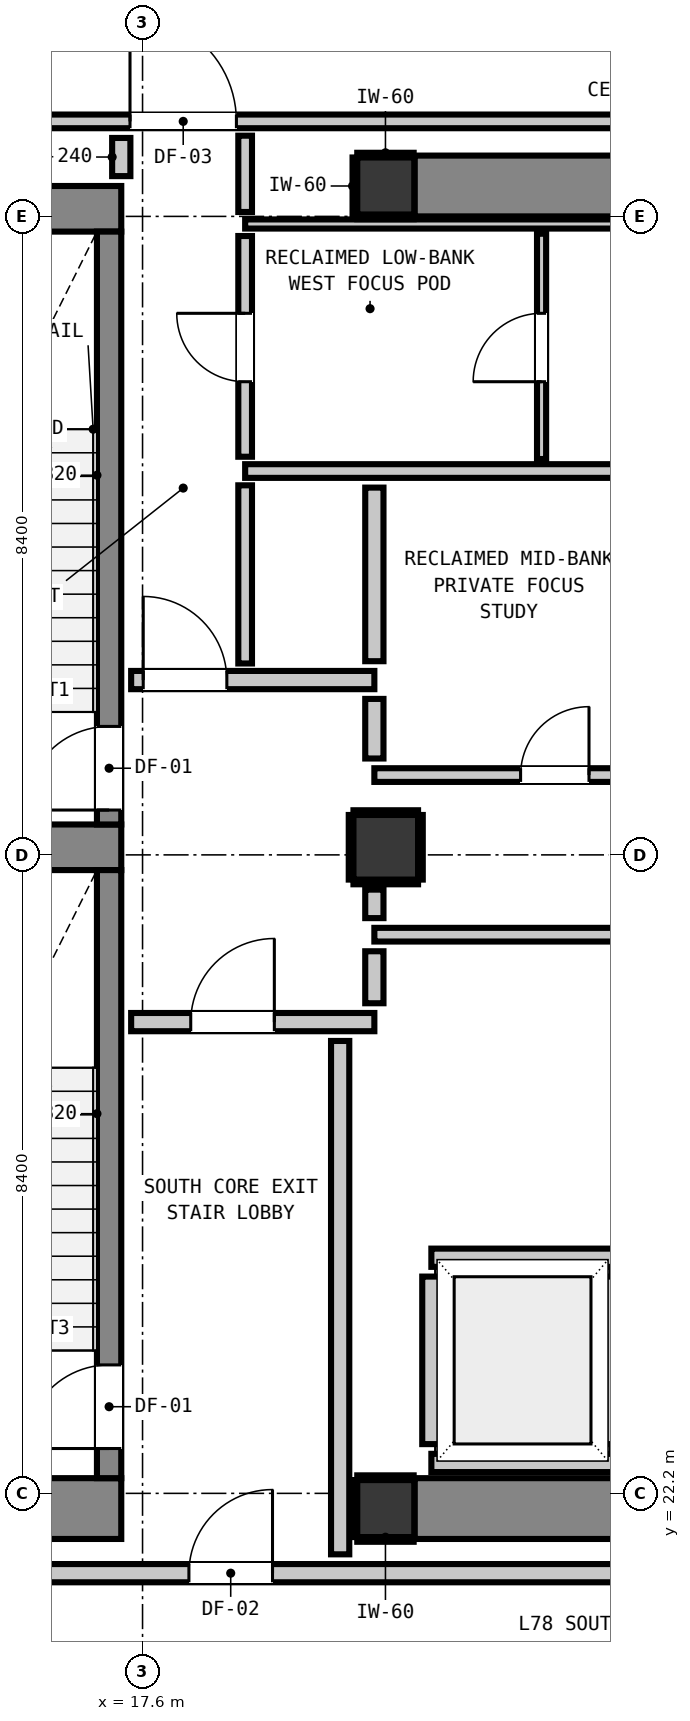
"""IFC4 building model, lengths in metres.
Left out: names, types, materials, properties, quantities, classifications, styles, units other than length and angle.
Written with IfcOpenShell. Run it as: python <this file> out.ifc"""

import sys

from ifc_helpers import new_model, si_unit, direction, frame, frame_2d, origin, origin_2d, place, context, subcontext, project, spatial, rectangle, extrude, element, fill, save


model = new_model("IFC4")
c1 = context("Model", 3, precision=1e-05, world=origin(), true_north=direction((0.0, 1.0)))
c2 = subcontext(c1, "Body", "Model", "MODEL_VIEW")
j1 = project(units=[si_unit("LENGTHUNIT", "METRE"), si_unit("PLANEANGLEUNIT", "RADIAN")], contexts=[c1])
p1 = place(None, origin())
s1 = spatial("IfcSite", under=j1, at=p1, CompositionType="ELEMENT")
p2 = place(p1, origin())
s2 = spatial("IfcBuilding", under=s1, at=p2, CompositionType="ELEMENT")
p3 = place(p2, frame((0.0, 0.0, 268.88)))
s3 = spatial("IfcBuildingStorey", under=s2, at=p3, CompositionType="ELEMENT", Elevation=268.88)
for number, where, z_axis, x_axis in (
    (1, (20.8, 22.0, 0.0), (0.0, 0.0, 1.0), (1.0, 0.0, 0.0)),
    (2, (20.8, 39.4, 0.0), (0.0, 0.0, 1.0), (1.0, 0.0, 0.0)),
):
    element("IfcColumn", number, at=place(p3, frame(where, z_axis=z_axis, x_axis=x_axis)), inside=s3, PredefinedType="COLUMN", context=c2, shape_type="SweptSolid", body=[
        extrude(rectangle(XDim=0.75, YDim=0.75, at=origin_2d()), origin(), (0.0, 0.0, 1.0), 4.6),
    ])
p4 = place(p3, frame((13.24, 22.0, 0.0), z_axis=(0.0, 0.0, 1.0), x_axis=(1.0, 0.0, 0.0)))
e3 = element("IfcWall", 3, at=p4, inside=s3, PredefinedType="SHEAR", context=c2, shape_type="SweptSolid", body=[
    extrude(rectangle(XDim=4.08, YDim=0.8, at=frame_2d((2.04, 0.0))), origin(), (0.0, 0.0, 1.0), 4.6),
])
p5 = place(p3, frame((13.24, 39.1, 0.0), z_axis=(0.0, 0.0, 1.0), x_axis=(1.0, 0.0, 0.0)))
e4 = element("IfcWall", 4, at=p5, inside=s3, PredefinedType="SHEAR", context=c2, shape_type="SweptSolid", body=[
    extrude(rectangle(XDim=4.08, YDim=0.6, at=frame_2d((2.04, 0.0))), origin(), (0.0, 0.0, 1.0), 4.6),
])
p6 = place(p3, frame((13.78, 30.7, 0.0), z_axis=(0.0, 0.0, 1.0), x_axis=(1.0, 0.0, 0.0)))
e5 = element("IfcWall", 5, at=p6, inside=s3, PredefinedType="SHEAR", context=c2, shape_type="SweptSolid", body=[
    extrude(rectangle(XDim=3.54, YDim=0.6, at=frame_2d((1.77, 0.0))), origin(), (0.0, 0.0, 1.0), 4.6),
])
for number, where, z_axis, x_axis in (
    (6, (21.18, 22.0, 0.0), (0.0, 0.0, 1.0), (1.0, 0.0, 0.0)),
    (7, (21.18, 39.4, 0.0), (0.0, 0.0, 1.0), (1.0, 0.0, 0.0)),
):
    element("IfcWall", number, at=place(p3, frame(where, z_axis=z_axis, x_axis=x_axis)), inside=s3, PredefinedType="SHEAR", context=c2, shape_type="SweptSolid", body=[
        extrude(rectangle(XDim=7.64, YDim=0.8, at=frame_2d((3.82, 0.0))), origin(), (0.0, 0.0, 1.0), 4.6),
    ])
p7 = place(p3, frame((17.16, 31.0, 0.0), z_axis=(0.0, 0.0, 1.0), x_axis=(0.0, 1.0, 0.0)))
e8 = element("IfcWall", 8, at=p7, inside=s3, PredefinedType="SHEAR", context=c2, shape_type="SweptSolid", body=[
    extrude(rectangle(XDim=7.8, YDim=0.32, at=frame_2d((3.9, 0.0))), origin(), (0.0, 0.0, 1.0), 4.6),
])
p8 = place(p7, frame((0.19, 0.0, 0.0)))
e9 = element("IfcOpeningElement", 9, at=p8, cuts=e8, PredefinedType="OPENING", context=c2, shape_type="SweptSolid", body=[
    extrude(rectangle(XDim=1.1, YDim=2.15, at=frame_2d((0.55, 1.075))), frame((0.0, 0.17, 0.0), z_axis=(0.0, -1.0, 0.0), x_axis=(1.0, 0.0, 0.0)), (0.0, 0.0, 1.0), 0.34),
])
p9 = place(p3, frame((17.16, 22.4, 0.0), z_axis=(0.0, 0.0, 1.0), x_axis=(0.0, 1.0, 0.0)))
e10 = element("IfcWall", 10, at=p9, inside=s3, PredefinedType="SHEAR", context=c2, shape_type="SweptSolid", body=[
    extrude(rectangle(XDim=8.0, YDim=0.32, at=frame_2d((4.0, 0.0))), origin(), (0.0, 0.0, 1.0), 4.6),
])
p10 = place(p9, frame((0.39, 0.0, 0.0)))
e11 = element("IfcOpeningElement", 11, at=p10, cuts=e10, PredefinedType="OPENING", context=c2, shape_type="SweptSolid", body=[
    extrude(rectangle(XDim=1.1, YDim=2.15, at=frame_2d((0.55, 1.075))), frame((0.0, 0.17, 0.0), z_axis=(0.0, -1.0, 0.0), x_axis=(1.0, 0.0, 0.0)), (0.0, 0.0, 1.0), 0.34),
])
p11 = place(p3, frame((20.8, 30.7, 0.0), z_axis=(0.0, 0.0, 1.0), x_axis=(1.0, 0.0, 0.0)))
e12 = element("IfcColumn", 12, at=p11, inside=s3, PredefinedType="COLUMN", context=c2, shape_type="SweptSolid", body=[
    extrude(rectangle(XDim=0.85, YDim=0.85, at=origin_2d()), origin(), (0.0, 0.0, 1.0), 4.6),
])
for number, where, z_axis, x_axis in (
    (13, (21.4, 22.6, 0.0), (0.0, 0.0, 1.0), (1.0, 0.0, 0.0)),
    (14, (21.4, 25.3, 0.0), (0.0, 0.0, 1.0), (1.0, 0.0, 0.0)),
):
    element("IfcWall", number, at=place(p3, frame(where, z_axis=z_axis, x_axis=x_axis)), inside=s3, PredefinedType="PARTITIONING", context=c2, shape_type="SweptSolid", body=[
        extrude(rectangle(XDim=2.4, YDim=0.24, at=frame_2d((1.2, 0.0))), origin(), (0.0, 0.0, 1.0), 4.38),
    ])
for number, where, z_axis, x_axis in (
    (15, (21.4, 22.848, 0.0), (0.0, 0.0, 1.0), (0.0, 1.0, 0.0)),
    (16, (23.8, 22.848, 0.0), (0.0, 0.0, 1.0), (0.0, 1.0, 0.0)),
):
    element("IfcWall", number, at=place(p3, frame(where, z_axis=z_axis, x_axis=x_axis)), inside=s3, PredefinedType="PARTITIONING", context=c2, shape_type="SweptSolid", body=[
        extrude(rectangle(XDim=2.204, YDim=0.24, at=frame_2d((1.102, 0.0))), origin(), (0.0, 0.0, 1.0), 4.38),
    ])
p12 = place(p3, frame((13.012, 21.15, 0.0), z_axis=(0.0, 0.0, 1.0), x_axis=(1.0, 0.0, 0.0)))
e17 = element("IfcWall", 17, at=p12, inside=s3, PredefinedType="PARTITIONING", context=c2, shape_type="SweptSolid", body=[
    extrude(rectangle(XDim=28.201, YDim=0.24, at=frame_2d((14.101, 0.0))), origin(), (0.0, 0.0, 1.0), 4.38),
])
p13 = place(p12, frame((5.198, 0.0, 0.0)))
e18 = element("IfcOpeningElement", 18, at=p13, cuts=e17, PredefinedType="OPENING", context=c2, shape_type="SweptSolid", body=[
    extrude(rectangle(XDim=1.1, YDim=2.15, at=frame_2d((0.55, 1.075))), frame((0.0, 0.13, 0.0), z_axis=(0.0, -1.0, 0.0), x_axis=(1.0, 0.0, 0.0)), (0.0, 0.0, 1.0), 0.26),
])
p14 = place(p12, frame((25.989, 0.0, 0.0)))
e19 = element("IfcOpeningElement", 19, at=p14, cuts=e17, PredefinedType="OPENING", context=c2, shape_type="SweptSolid", body=[
    extrude(rectangle(XDim=0.9, YDim=2.1, at=frame_2d((0.45, 1.05))), frame((0.0, 0.13, 0.0), z_axis=(0.0, -1.0, 0.0), x_axis=(1.0, 0.0, 0.0)), (0.0, 0.0, 1.0), 0.26),
])
p15 = place(p3, frame((17.45, 28.4, 0.0), z_axis=(0.0, 0.0, 1.0), x_axis=(1.0, 0.0, 0.0)))
e20 = element("IfcWall", 20, at=p15, inside=s3, PredefinedType="PARTITIONING", context=c2, shape_type="SweptSolid", body=[
    extrude(rectangle(XDim=3.2, YDim=0.24, at=frame_2d((1.6, 0.0))), origin(), (0.0, 0.0, 1.0), 4.38),
])
p16 = place(p15, frame((0.784, 0.0, 0.0)))
e21 = element("IfcOpeningElement", 21, at=p16, cuts=e20, PredefinedType="OPENING", context=c2, shape_type="SweptSolid", body=[
    extrude(rectangle(XDim=1.1, YDim=2.15, at=frame_2d((0.55, 1.075))), frame((0.0, 0.13, 0.0), z_axis=(0.0, -1.0, 0.0), x_axis=(1.0, 0.0, 0.0)), (0.0, 0.0, 1.0), 0.26),
])
p17 = place(p3, frame((17.45, 32.9, 0.0), z_axis=(0.0, 0.0, 1.0), x_axis=(1.0, 0.0, 0.0)))
e22 = element("IfcWall", 22, at=p17, inside=s3, PredefinedType="PARTITIONING", context=c2, shape_type="SweptSolid", body=[
    extrude(rectangle(XDim=3.2, YDim=0.24, at=frame_2d((1.6, 0.0))), origin(), (0.0, 0.0, 1.0), 4.38),
])
p18 = place(p17, frame((0.159, 0.0, 0.0)))
e23 = element("IfcOpeningElement", 23, at=p18, cuts=e22, PredefinedType="OPENING", context=c2, shape_type="SweptSolid", body=[
    extrude(rectangle(XDim=1.1, YDim=2.15, at=frame_2d((0.55, 1.075))), frame((0.0, 0.13, 0.0), z_axis=(0.0, -1.0, 0.0), x_axis=(1.0, 0.0, 0.0)), (0.0, 0.0, 1.0), 0.26),
])
p19 = place(p3, frame((20.65, 29.55, 0.0), z_axis=(0.0, 0.0, 1.0), x_axis=(1.0, 0.0, 0.0)))
e24 = element("IfcWall", 24, at=p19, inside=s3, PredefinedType="PARTITIONING", context=c2, shape_type="SweptSolid", body=[
    extrude(rectangle(XDim=9.325, YDim=0.18, at=frame_2d((4.663, 0.0))), origin(), (0.0, 0.0, 1.0), 4.38),
])
p20 = place(p3, frame((20.65, 31.65, 0.0), z_axis=(0.0, 0.0, 1.0), x_axis=(1.0, 0.0, 0.0)))
e25 = element("IfcWall", 25, at=p20, inside=s3, PredefinedType="PARTITIONING", context=c2, shape_type="SweptSolid", body=[
    extrude(rectangle(XDim=7.7, YDim=0.18, at=frame_2d((3.85, 0.0))), origin(), (0.0, 0.0, 1.0), 4.38),
])
p21 = place(p20, frame((1.924, 0.0, 0.0)))
e26 = element("IfcOpeningElement", 26, at=p21, cuts=e25, PredefinedType="OPENING", context=c2, shape_type="SweptSolid", body=[
    extrude(rectangle(XDim=0.9, YDim=2.1, at=frame_2d((0.45, 1.05))), frame((0.0, 0.1, 0.0), z_axis=(0.0, -1.0, 0.0), x_axis=(1.0, 0.0, 0.0)), (0.0, 0.0, 1.0), 0.2),
])
p22 = place(p3, frame((18.95, 35.65, 0.0), z_axis=(0.0, 0.0, 1.0), x_axis=(1.0, 0.0, 0.0)))
e27 = element("IfcWall", 27, at=p22, inside=s3, PredefinedType="PARTITIONING", context=c2, shape_type="SweptSolid", body=[
    extrude(rectangle(XDim=11.025, YDim=0.18, at=frame_2d((5.513, 0.0))), origin(), (0.0, 0.0, 1.0), 4.38),
])
p23 = place(p3, frame((4.587, 40.25, 0.0), z_axis=(0.0, 0.0, 1.0), x_axis=(1.0, 0.0, 0.0)))
e28 = element("IfcWall", 28, at=p23, inside=s3, PredefinedType="PARTITIONING", context=c2, shape_type="SweptSolid", body=[
    extrude(rectangle(XDim=36.626, YDim=0.18, at=frame_2d((18.313, 0.0))), origin(), (0.0, 0.0, 1.0), 4.38),
])
p24 = place(p23, frame((12.848, 0.0, 0.0)))
e29 = element("IfcOpeningElement", 29, at=p24, cuts=e28, PredefinedType="OPENING", context=c2, shape_type="SweptSolid", body=[
    extrude(rectangle(XDim=1.4, YDim=2.15, at=frame_2d((0.7, 1.075))), frame((0.0, 0.1, 0.0), z_axis=(0.0, -1.0, 0.0), x_axis=(1.0, 0.0, 0.0)), (0.0, 0.0, 1.0), 0.2),
])
p25 = place(p23, frame((5.863, 0.0, 0.0)))
e30 = element("IfcOpeningElement", 30, at=p25, cuts=e28, PredefinedType="OPENING", context=c2, shape_type="SweptSolid", body=[
    extrude(rectangle(XDim=1.4, YDim=2.15, at=frame_2d((0.7, 1.075))), frame((0.0, 0.1, 0.0), z_axis=(0.0, -1.0, 0.0), x_axis=(1.0, 0.0, 0.0)), (0.0, 0.0, 1.0), 0.2),
])
p26 = place(p23, frame((2.337, 0.0, 0.0)))
e31 = element("IfcOpeningElement", 31, at=p26, cuts=e28, PredefinedType="OPENING", context=c2, shape_type="SweptSolid", body=[
    extrude(rectangle(XDim=0.95, YDim=2.1, at=frame_2d((0.475, 1.05))), frame((0.0, 0.1, 0.0), z_axis=(0.0, -1.0, 0.0), x_axis=(1.0, 0.0, 0.0)), (0.0, 0.0, 1.0), 0.2),
])
p27 = place(p23, frame((34.414, 0.0, 0.0)))
e32 = element("IfcOpeningElement", 32, at=p27, cuts=e28, PredefinedType="OPENING", context=c2, shape_type="SweptSolid", body=[
    extrude(rectangle(XDim=0.9, YDim=2.1, at=frame_2d((0.45, 1.05))), frame((0.0, 0.1, 0.0), z_axis=(0.0, -1.0, 0.0), x_axis=(1.0, 0.0, 0.0)), (0.0, 0.0, 1.0), 0.2),
])
p28 = place(p3, frame((18.95, 38.9, 0.0), z_axis=(0.0, 0.0, 1.0), x_axis=(1.0, 0.0, 0.0)))
e33 = element("IfcWall", 33, at=p28, inside=s3, PredefinedType="PARTITIONING", context=c2, shape_type="SweptSolid", body=[
    extrude(rectangle(XDim=11.025, YDim=0.12, at=frame_2d((5.513, 0.0))), origin(), (0.0, 0.0, 1.0), 4.38),
])
p29 = place(p3, frame((17.32, 39.53, 0.0), z_axis=(0.0, 0.0, 1.0), x_axis=(0.0, 1.0, 0.0)))
e34 = element("IfcWall", 34, at=p29, inside=s3, PredefinedType="PARTITIONING", context=c2, shape_type="SweptSolid", body=[
    extrude(rectangle(XDim=0.502, YDim=0.24, at=frame_2d((0.251, 0.0))), origin(), (0.0, 0.0, 1.0), 4.38),
])
p30 = place(p3, frame((20.2, 21.398, 0.0), z_axis=(0.0, 0.0, 1.0), x_axis=(0.0, 1.0, 0.0)))
e35 = element("IfcWall", 35, at=p30, inside=s3, PredefinedType="PARTITIONING", context=c2, shape_type="SweptSolid", body=[
    extrude(rectangle(XDim=6.754, YDim=0.24, at=frame_2d((3.377, 0.0))), origin(), (0.0, 0.0, 1.0), 4.38),
])
p31 = place(p3, frame((20.65, 28.648, 0.0), z_axis=(0.0, 0.0, 1.0), x_axis=(0.0, 1.0, 0.0)))
e36 = element("IfcWall", 36, at=p31, inside=s3, PredefinedType="PARTITIONING", context=c2, shape_type="SweptSolid", body=[
    extrude(rectangle(XDim=0.684, YDim=0.24, at=frame_2d((0.342, 0.0))), origin(), (0.0, 0.0, 1.0), 3.615),
])
p32 = place(p3, frame((20.65, 29.768, 0.0), z_axis=(0.0, 0.0, 1.0), x_axis=(0.0, 1.0, 0.0)))
e37 = element("IfcWall", 37, at=p32, inside=s3, PredefinedType="PARTITIONING", context=c2, shape_type="SweptSolid", body=[
    extrude(rectangle(XDim=0.375, YDim=0.24, at=frame_2d((0.188, 0.0))), origin(), (0.0, 0.0, 1.0), 3.615),
])
p33 = place(p3, frame((20.65, 31.868, 0.0), z_axis=(0.0, 0.0, 1.0), x_axis=(0.0, 1.0, 0.0)))
e38 = element("IfcWall", 38, at=p33, inside=s3, PredefinedType="PARTITIONING", context=c2, shape_type="SweptSolid", body=[
    extrude(rectangle(XDim=0.784, YDim=0.24, at=frame_2d((0.392, 0.0))), origin(), (0.0, 0.0, 1.0), 3.615),
])
p34 = place(p3, frame((20.65, 33.148, 0.0), z_axis=(0.0, 0.0, 1.0), x_axis=(0.0, 1.0, 0.0)))
e39 = element("IfcWall", 39, at=p34, inside=s3, PredefinedType="PARTITIONING", context=c2, shape_type="SweptSolid", body=[
    extrude(rectangle(XDim=2.284, YDim=0.24, at=frame_2d((1.142, 0.0))), origin(), (0.0, 0.0, 1.0), 3.615),
])
p35 = place(p3, frame((18.95, 33.118, 0.0), z_axis=(0.0, 0.0, 1.0), x_axis=(0.0, 1.0, 0.0)))
e40 = element("IfcWall", 40, at=p35, inside=s3, PredefinedType="PARTITIONING", context=c2, shape_type="SweptSolid", body=[
    extrude(rectangle(XDim=2.344, YDim=0.18, at=frame_2d((1.172, 0.0))), origin(), (0.0, 0.0, 1.0), 4.38),
])
p36 = place(p3, frame((18.95, 35.838, 0.0), z_axis=(0.0, 0.0, 1.0), x_axis=(0.0, 1.0, 0.0)))
e41 = element("IfcWall", 41, at=p36, inside=s3, PredefinedType="PARTITIONING", context=c2, shape_type="SweptSolid", body=[
    extrude(rectangle(XDim=2.904, YDim=0.18, at=frame_2d((1.452, 0.0))), origin(), (0.0, 0.0, 1.0), 4.38),
])
p37 = place(p36, frame((0.987, 0.0, 0.0)))
e42 = element("IfcOpeningElement", 42, at=p37, cuts=e41, PredefinedType="OPENING", context=c2, shape_type="SweptSolid", body=[
    extrude(rectangle(XDim=0.9, YDim=2.1, at=frame_2d((0.45, 1.05))), frame((0.0, 0.1, 0.0), z_axis=(0.0, -1.0, 0.0), x_axis=(1.0, 0.0, 0.0)), (0.0, 0.0, 1.0), 0.2),
])
p38 = place(p3, frame((18.95, 39.058, 0.0), z_axis=(0.0, 0.0, 1.0), x_axis=(0.0, 1.0, 0.0)))
e43 = element("IfcWall", 43, at=p38, inside=s3, PredefinedType="PARTITIONING", context=c2, shape_type="SweptSolid", body=[
    extrude(rectangle(XDim=1.004, YDim=0.18, at=frame_2d((0.502, 0.0))), origin(), (0.0, 0.0, 1.0), 4.38),
])
p39 = place(p3, frame((22.85, 35.808, 0.0), z_axis=(0.0, 0.0, 1.0), x_axis=(0.0, 1.0, 0.0)))
e44 = element("IfcWall", 44, at=p39, inside=s3, PredefinedType="PARTITIONING", context=c2, shape_type="SweptSolid", body=[
    extrude(rectangle(XDim=2.964, YDim=0.12, at=frame_2d((1.482, 0.0))), origin(), (0.0, 0.0, 1.0), 4.38),
])
p40 = place(p39, frame((1.017, 0.0, 0.0)))
e45 = element("IfcOpeningElement", 45, at=p40, cuts=e44, PredefinedType="OPENING", context=c2, shape_type="SweptSolid", body=[
    extrude(rectangle(XDim=0.9, YDim=2.1, at=frame_2d((0.45, 1.05))), frame((0.0, 0.07, 0.0), z_axis=(0.0, -1.0, 0.0), x_axis=(1.0, 0.0, 0.0)), (0.0, 0.0, 1.0), 0.14),
])
for number, where, z_axis, x_axis in (
    (46, (20.425, 21.593, 0.0), (0.0, 0.0, 1.0), (1.0, 0.0, 0.0)),
    (47, (20.425, 22.407, 0.0), (0.0, 0.0, 1.0), (1.0, 0.0, 0.0)),
):
    element("IfcWall", number, at=place(p3, frame(where, z_axis=z_axis, x_axis=x_axis)), inside=s3, PredefinedType="PARTITIONING", context=c2, shape_type="SweptSolid", body=[
        extrude(rectangle(XDim=0.742, YDim=0.06, at=frame_2d((0.371, 0.0))), origin(), (0.0, 0.0, 1.0), 1.45),
    ])
p41 = place(p3, frame((20.393, 21.625, 0.0), z_axis=(0.0, 0.0, 1.0), x_axis=(0.0, 1.0, 0.0)))
e48 = element("IfcWall", 48, at=p41, inside=s3, PredefinedType="PARTITIONING", context=c2, shape_type="SweptSolid", body=[
    extrude(rectangle(XDim=0.75, YDim=0.06, at=frame_2d((0.375, 0.0))), origin(), (0.0, 0.0, 1.0), 1.45),
])
for number, where, z_axis, x_axis in (
    (49, (20.425, 38.993, 0.0), (0.0, 0.0, 1.0), (1.0, 0.0, 0.0)),
    (50, (20.425, 39.807, 0.0), (0.0, 0.0, 1.0), (1.0, 0.0, 0.0)),
):
    element("IfcWall", number, at=place(p3, frame(where, z_axis=z_axis, x_axis=x_axis)), inside=s3, PredefinedType="PARTITIONING", context=c2, shape_type="SweptSolid", body=[
        extrude(rectangle(XDim=0.742, YDim=0.06, at=frame_2d((0.371, 0.0))), origin(), (0.0, 0.0, 1.0), 1.45),
    ])
p42 = place(p3, frame((20.393, 39.025, 0.0), z_axis=(0.0, 0.0, 1.0), x_axis=(0.0, 1.0, 0.0)))
e51 = element("IfcWall", 51, at=p42, inside=s3, PredefinedType="PARTITIONING", context=c2, shape_type="SweptSolid", body=[
    extrude(rectangle(XDim=0.75, YDim=0.06, at=frame_2d((0.375, 0.0))), origin(), (0.0, 0.0, 1.0), 1.45),
])
for number, where, z_axis, x_axis in (
    (52, (20.375, 30.243, 0.0), (0.0, 0.0, 1.0), (1.0, 0.0, 0.0)),
    (53, (20.375, 31.157, 0.0), (0.0, 0.0, 1.0), (1.0, 0.0, 0.0)),
    (54, (20.343, 30.275, 0.0), (0.0, 0.0, 1.0), (0.0, 1.0, 0.0)),
    (55, (21.257, 30.275, 0.0), (0.0, 0.0, 1.0), (0.0, 1.0, 0.0)),
):
    element("IfcWall", number, at=place(p3, frame(where, z_axis=z_axis, x_axis=x_axis)), inside=s3, PredefinedType="PARTITIONING", context=c2, shape_type="SweptSolid", body=[
        extrude(rectangle(XDim=0.85, YDim=0.06, at=frame_2d((0.425, 0.0))), origin(), (0.0, 0.0, 1.0), 1.45),
    ])
p43 = place(p8, origin())
e56 = element("IfcDoor", 56, at=p43, inside=s3, OperationType="SINGLE_SWING_LEFT", PredefinedType="DOOR", context=c2, shape_type="SweptSolid", body=[
    extrude(rectangle(XDim=1.1, YDim=2.15, at=frame_2d((0.55, 1.075))), frame((0.0, 0.025, 0.0), z_axis=(0.0, -1.0, 0.0), x_axis=(1.0, 0.0, 0.0)), (0.0, 0.0, 1.0), 0.05),
])
fill(e9, e56)
p44 = place(p10, origin())
e57 = element("IfcDoor", 57, at=p44, inside=s3, OperationType="SINGLE_SWING_LEFT", PredefinedType="DOOR", context=c2, shape_type="SweptSolid", body=[
    extrude(rectangle(XDim=1.1, YDim=2.15, at=frame_2d((0.55, 1.075))), frame((0.0, 0.025, 0.0), z_axis=(0.0, -1.0, 0.0), x_axis=(1.0, 0.0, 0.0)), (0.0, 0.0, 1.0), 0.05),
])
fill(e11, e57)
p45 = place(p16, origin())
e58 = element("IfcDoor", 58, at=p45, inside=s3, OperationType="SINGLE_SWING_RIGHT", PredefinedType="DOOR", context=c2, shape_type="SweptSolid", body=[
    extrude(rectangle(XDim=1.1, YDim=2.15, at=frame_2d((0.55, 1.075))), frame((0.0, 0.025, 0.0), z_axis=(0.0, -1.0, 0.0), x_axis=(1.0, 0.0, 0.0)), (0.0, 0.0, 1.0), 0.05),
])
fill(e21, e58)
p46 = place(p18, origin())
e59 = element("IfcDoor", 59, at=p46, inside=s3, OperationType="SINGLE_SWING_LEFT", PredefinedType="DOOR", context=c2, shape_type="SweptSolid", body=[
    extrude(rectangle(XDim=1.1, YDim=2.15, at=frame_2d((0.55, 1.075))), frame((0.0, 0.025, 0.0), z_axis=(0.0, -1.0, 0.0), x_axis=(1.0, 0.0, 0.0)), (0.0, 0.0, 1.0), 0.05),
])
fill(e23, e59)
p47 = place(p13, origin())
e60 = element("IfcDoor", 60, at=p47, inside=s3, OperationType="SINGLE_SWING_RIGHT", PredefinedType="DOOR", context=c2, shape_type="SweptSolid", body=[
    extrude(rectangle(XDim=1.1, YDim=2.15, at=frame_2d((0.55, 1.075))), frame((0.0, 0.025, 0.0), z_axis=(0.0, -1.0, 0.0), x_axis=(1.0, 0.0, 0.0)), (0.0, 0.0, 1.0), 0.05),
])
fill(e18, e60)
p48 = place(p24, origin())
e61 = element("IfcDoor", 61, at=p48, inside=s3, OperationType="SINGLE_SWING_LEFT", PredefinedType="DOOR", context=c2, shape_type="SweptSolid", body=[
    extrude(rectangle(XDim=1.4, YDim=2.15, at=frame_2d((0.7, 1.075))), frame((0.0, 0.025, 0.0), z_axis=(0.0, -1.0, 0.0), x_axis=(1.0, 0.0, 0.0)), (0.0, 0.0, 1.0), 0.05),
])
fill(e29, e61)
p49 = place(p37, origin())
e62 = element("IfcDoor", 62, at=p49, inside=s3, OperationType="SINGLE_SWING_RIGHT", PredefinedType="DOOR", context=c2, shape_type="SweptSolid", body=[
    extrude(rectangle(XDim=0.9, YDim=2.1, at=frame_2d((0.45, 1.05))), frame((0.0, 0.025, 0.0), z_axis=(0.0, -1.0, 0.0), x_axis=(1.0, 0.0, 0.0)), (0.0, 0.0, 1.0), 0.05),
])
fill(e42, e62)
p50 = place(p40, origin())
e63 = element("IfcDoor", 63, at=p50, inside=s3, OperationType="SINGLE_SWING_LEFT", PredefinedType="DOOR", context=c2, shape_type="SweptSolid", body=[
    extrude(rectangle(XDim=0.9, YDim=2.1, at=frame_2d((0.45, 1.05))), frame((0.0, 0.025, 0.0), z_axis=(0.0, -1.0, 0.0), x_axis=(1.0, 0.0, 0.0)), (0.0, 0.0, 1.0), 0.05),
])
fill(e45, e63)
p51 = place(p21, origin())
e64 = element("IfcDoor", 64, at=p51, inside=s3, OperationType="SINGLE_SWING_RIGHT", PredefinedType="DOOR", context=c2, shape_type="SweptSolid", body=[
    extrude(rectangle(XDim=0.9, YDim=2.1, at=frame_2d((0.45, 1.05))), frame((0.0, 0.025, 0.0), z_axis=(0.0, -1.0, 0.0), x_axis=(1.0, 0.0, 0.0)), (0.0, 0.0, 1.0), 0.05),
])
fill(e26, e64)
save(model, sys.argv[1])
